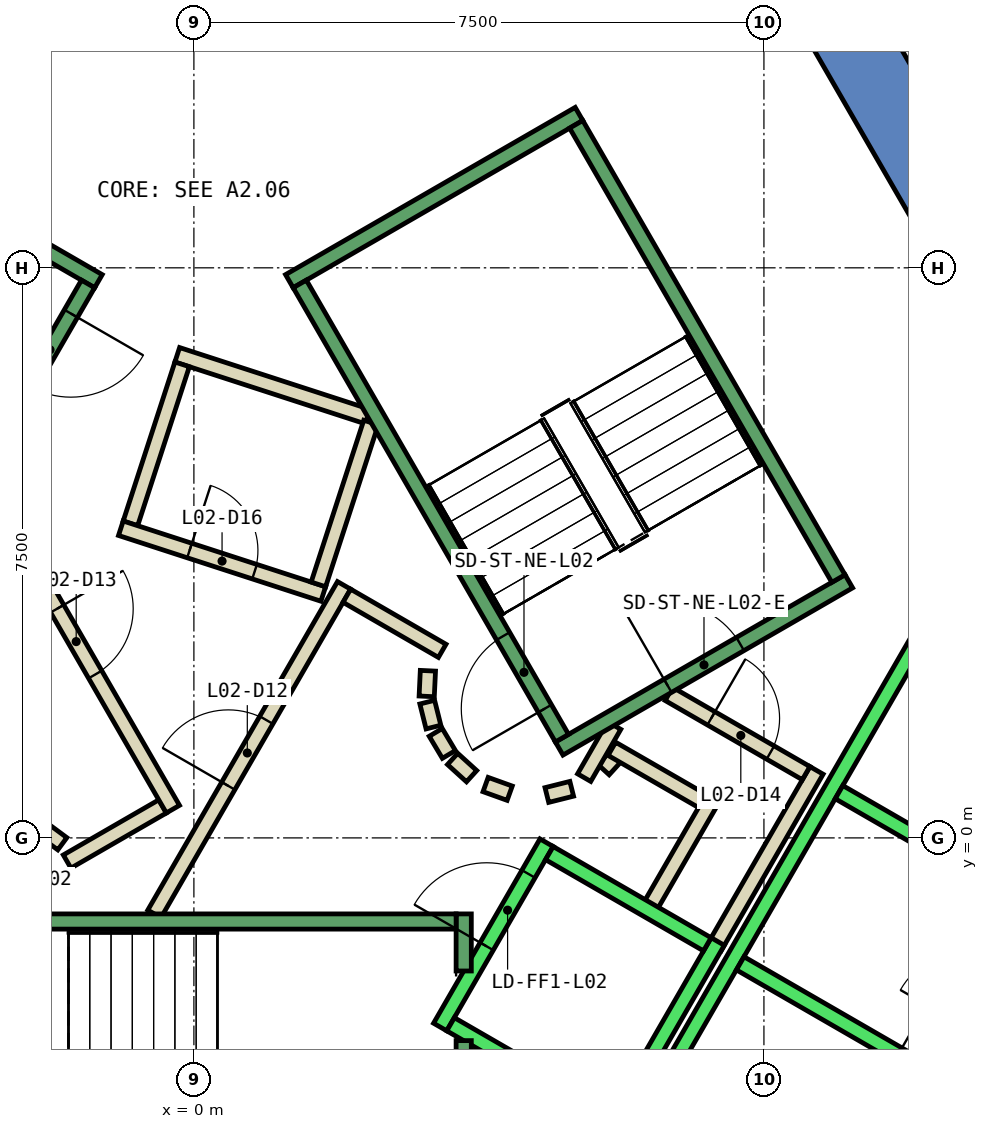
"""IFC4 building model, lengths in metres.
Left out: names, types, materials, properties, quantities, classifications, styles, units other than length and angle.
Written with IfcOpenShell. Run it as: python <this file> out.ifc"""

import sys

from ifc_helpers import new_model, si_unit, direction, frame, frame_2d, origin, place, context, subcontext, project, spatial, polyline, rectangle, outline, extrude, element, fill, save


model = new_model("IFC4")
c1 = context("Model", 3, precision=1e-05, world=origin(), true_north=direction((0.0, 1.0)))
c2 = subcontext(c1, "Body", "Model", "MODEL_VIEW")
j1 = project(units=[si_unit("LENGTHUNIT", "METRE"), si_unit("PLANEANGLEUNIT", "RADIAN")], contexts=[c1])
p1 = place(None, origin())
s1 = spatial("IfcSite", under=j1, at=p1, CompositionType="ELEMENT")
p2 = place(p1, origin())
s2 = spatial("IfcBuilding", under=s1, at=p2, CompositionType="ELEMENT")
p3 = place(p2, frame((0.0, 0.0, 15.0)))
s3 = spatial("IfcBuildingStorey", under=s2, at=p3, CompositionType="ELEMENT", Elevation=15.0)
p4 = place(p3, frame((0.0, 0.0, -0.45)))
e1 = element("IfcWall", 1, at=p4, inside=s3, PredefinedType="SHEAR", context=c2, shape_type="SweptSolid", body=[
    extrude(outline(polyline([(8.517, 11.748), (7.651, 11.248), (12.702, 2.5), (13.856, 2.5), (8.517, 11.748)])), origin(), (0.0, 0.0, 1.0), 5.0),
])
p5 = place(p3, frame((0.0, 0.0, -0.45)))
e2 = element("IfcWall", 2, at=p5, inside=s3, PredefinedType="SHEAR", context=c2, shape_type="SweptSolid", body=[
    extrude(outline(polyline([(10.717, -2.937), (9.851, -2.437), (9.201, -3.563), (10.067, -4.063), (10.717, -2.937)])), origin(), (0.0, 0.0, 1.0), 5.0),
])
p6 = place(p3, frame((5.39, 0.898, 0.0), z_axis=(0.0, 0.0, 1.0), x_axis=(0.673828488714, 0.738887791073, 0.0)))
e3 = element("IfcWall", 3, at=p6, inside=s3, PredefinedType="PARTITIONING", context=c2, shape_type="SweptSolid", body=[
    extrude(rectangle(XDim=0.263, YDim=0.2, at=frame_2d((0.131, 0.0))), origin(), (0.0, 0.0, 1.0), 4.55),
])
p7 = place(p3, frame((5.499, 1.172, 0.0), z_axis=(0.0, 0.0, 1.0), x_axis=(0.866333505267, -0.499465972466, 0.0)))
e4 = element("IfcWall", 4, at=p7, inside=s3, PredefinedType="PARTITIONING", context=c2, shape_type="SweptSolid", body=[
    extrude(rectangle(XDim=1.374, YDim=0.2, at=frame_2d((0.687, 0.0))), origin(), (0.0, 0.0, 1.0), 4.55),
])
p8 = place(p3, frame((6.826, 0.522, 0.0), z_axis=(0.0, 0.0, 1.0), x_axis=(-0.500016722714, -0.866015748706, 0.0)))
e5 = element("IfcWall", 5, at=p8, inside=s3, PredefinedType="PARTITIONING", context=c2, shape_type="SweptSolid", body=[
    extrude(rectangle(XDim=1.7, YDim=0.2, at=frame_2d((0.85, 0.0))), origin(), (0.0, 0.0, 1.0), 4.55),
])
p9 = place(p3, frame((8.192, 0.888, 0.0), z_axis=(0.0, 0.0, 1.0), x_axis=(-0.499940625693, -0.866059680843, 0.0)))
e6 = element("IfcWall", 6, at=p9, inside=s3, PredefinedType="PARTITIONING", context=c2, shape_type="SweptSolid", body=[
    extrude(rectangle(XDim=2.68, YDim=0.2, at=frame_2d((1.34, 0.0))), origin(), (0.0, 0.0, 1.0), 4.55),
])
p10 = place(p3, frame((5.135, 0.793, 0.0), z_axis=(0.0, 0.0, 1.0), x_axis=(0.499526442893, 0.866298639529, 0.0)))
e7 = element("IfcWall", 7, at=p10, inside=s3, PredefinedType="PARTITIONING", context=c2, shape_type="SweptSolid", body=[
    extrude(rectangle(XDim=0.791, YDim=0.2, at=frame_2d((0.396, 0.0))), origin(), (0.0, 0.0, 1.0), 4.55),
])
p11 = place(p3, frame((6.25, 1.894, 0.0), z_axis=(0.0, 0.0, 1.0), x_axis=(0.866043184279, -0.499969202016, 0.0)))
e8 = element("IfcWall", 8, at=p11, inside=s3, PredefinedType="PARTITIONING", context=c2, shape_type="SweptSolid", body=[
    extrude(rectangle(XDim=2.084, YDim=0.2, at=frame_2d((1.042, 0.0))), origin(), (0.0, 0.0, 1.0), 4.55),
])
p12 = place(p11, frame((0.642, 0.0, 0.0)))
e9 = element("IfcOpeningElement", 9, at=p12, cuts=e8, PredefinedType="OPENING", context=c2, shape_type="SweptSolid", body=[
    extrude(rectangle(XDim=0.9, YDim=2.1, at=frame_2d((0.45, 1.05))), frame((0.0, 0.11, 0.0), z_axis=(0.0, -1.0, 0.0), x_axis=(1.0, 0.0, 0.0)), (0.0, 0.0, 1.0), 0.22),
])
p13 = place(p3, frame((2.285, 5.543, 0.0), z_axis=(0.0, 0.0, 1.0), x_axis=(-0.951121264368, 0.308817649215, 0.0)))
e10 = element("IfcWall", 10, at=p13, inside=s3, PredefinedType="PARTITIONING", context=c2, shape_type="SweptSolid", body=[
    extrude(rectangle(XDim=2.633, YDim=0.2, at=frame_2d((1.316, 0.0))), origin(), (0.0, 0.0, 1.0), 4.55),
])
p14 = place(p3, frame((-0.155, 6.23, 0.0), z_axis=(0.0, 0.0, 1.0), x_axis=(-0.309093600997, -0.951031621884, 0.0)))
e11 = element("IfcWall", 11, at=p14, inside=s3, PredefinedType="PARTITIONING", context=c2, shape_type="SweptSolid", body=[
    extrude(rectangle(XDim=2.2, YDim=0.2, at=frame_2d((1.1, 0.0))), origin(), (0.0, 0.0, 1.0), 4.55),
])
p15 = place(p3, frame((-0.961, 4.074, 0.0), z_axis=(0.0, 0.0, 1.0), x_axis=(0.951079555704, -0.308946077369, 0.0)))
e12 = element("IfcWall", 12, at=p15, inside=s3, PredefinedType="PARTITIONING", context=c2, shape_type="SweptSolid", body=[
    extrude(rectangle(XDim=2.8, YDim=0.2, at=frame_2d((1.4, 0.0))), origin(), (0.0, 0.0, 1.0), 4.55),
])
p16 = place(p15, frame((0.95, 0.0, 0.0)))
e13 = element("IfcOpeningElement", 13, at=p16, cuts=e12, PredefinedType="OPENING", context=c2, shape_type="SweptSolid", body=[
    extrude(rectangle(XDim=0.9, YDim=2.1, at=frame_2d((0.45, 1.05))), frame((0.0, 0.11, 0.0), z_axis=(0.0, -1.0, 0.0), x_axis=(1.0, 0.0, 0.0)), (0.0, 0.0, 1.0), 0.22),
])
p17 = place(p3, frame((1.638, 3.335, 0.0), z_axis=(0.0, 0.0, 1.0), x_axis=(0.309152647294, 0.951012429294, 0.0)))
e14 = element("IfcWall", 14, at=p17, inside=s3, PredefinedType="PARTITIONING", context=c2, shape_type="SweptSolid", body=[
    extrude(rectangle(XDim=2.239, YDim=0.2, at=frame_2d((1.119, 0.0))), origin(), (0.0, 0.0, 1.0), 4.55),
])
p18 = place(p3, frame((3.079, 2.199, 0.0), z_axis=(0.0, 0.0, 1.0), x_axis=(-0.047771483479, -0.998858290933, 0.0)))
e15 = element("IfcWall", 15, at=p18, inside=s3, PredefinedType="PARTITIONING", context=c2, shape_type="SweptSolid", body=[
    extrude(rectangle(XDim=0.337, YDim=0.2, at=frame_2d((0.169, 0.0))), origin(), (0.0, 0.0, 1.0), 4.55),
])
p19 = place(p3, frame((3.07, 1.786, 0.0), z_axis=(0.0, 0.0, 1.0), x_axis=(0.242705583207, -0.970099994784, 0.0)))
e16 = element("IfcWall", 16, at=p19, inside=s3, PredefinedType="PARTITIONING", context=c2, shape_type="SweptSolid", body=[
    extrude(rectangle(XDim=0.338, YDim=0.2, at=frame_2d((0.169, 0.0))), origin(), (0.0, 0.0, 1.0), 4.55),
])
for number, where, z_axis, x_axis in (
    (17, (3.182, 1.388, 0.0), (0.0, 0.0, 1.0), (0.512, -0.859, 0.0)),
    (18, (3.404, 1.039, 0.0), (0.0, 0.0, 1.0), (0.74, -0.672, 0.0)),
):
    element("IfcWall", number, at=place(p3, frame(where, z_axis=z_axis, x_axis=x_axis)), inside=s3, PredefinedType="PARTITIONING", context=c2, shape_type="SweptSolid", body=[
        extrude(rectangle(XDim=0.338, YDim=0.2, at=frame_2d((0.169, 0.0))), origin(), (0.0, 0.0, 1.0), 4.55),
    ])
p20 = place(p3, frame((3.838, 0.702, 0.0), z_axis=(0.0, 0.0, 1.0), x_axis=(0.941035081519, -0.338308993895, 0.0)))
e19 = element("IfcWall", 19, at=p20, inside=s3, PredefinedType="PARTITIONING", context=c2, shape_type="SweptSolid", body=[
    extrude(rectangle(XDim=0.337, YDim=0.2, at=frame_2d((0.168, 0.0))), origin(), (0.0, 0.0, 1.0), 4.55),
])
p21 = place(p3, frame((4.644, 0.564, 0.0), z_axis=(0.0, 0.0, 1.0), x_axis=(0.969929076366, 0.243387729394, 0.0)))
e20 = element("IfcWall", 20, at=p21, inside=s3, PredefinedType="PARTITIONING", context=c2, shape_type="SweptSolid", body=[
    extrude(rectangle(XDim=0.337, YDim=0.2, at=frame_2d((0.168, 0.0))), origin(), (0.0, 0.0, 1.0), 4.55),
])
p22 = place(p3, frame((-0.52, -1.0, 0.0), z_axis=(0.0, 0.0, 1.0), x_axis=(0.50011622646, 0.865958290007, 0.0)))
e21 = element("IfcWall", 21, at=p22, inside=s3, PredefinedType="PARTITIONING", context=c2, shape_type="SweptSolid", body=[
    extrude(rectangle(XDim=4.991, YDim=0.2, at=frame_2d((2.496, 0.0))), origin(), (0.0, 0.0, 1.0), 4.55),
])
p23 = place(p22, frame((1.945, 0.0, 0.0)))
e22 = element("IfcOpeningElement", 22, at=p23, cuts=e21, PredefinedType="OPENING", context=c2, shape_type="SweptSolid", body=[
    extrude(rectangle(XDim=1.0, YDim=2.1, at=frame_2d((0.5, 1.05))), frame((0.0, 0.11, 0.0), z_axis=(0.0, -1.0, 0.0), x_axis=(1.0, 0.0, 0.0)), (0.0, 0.0, 1.0), 0.22),
])
p24 = place(p3, frame((2.012, 3.186, 0.0), z_axis=(0.0, 0.0, 1.0), x_axis=(0.865891012941, -0.500232699559, 0.0)))
e23 = element("IfcWall", 23, at=p24, inside=s3, PredefinedType="PARTITIONING", context=c2, shape_type="SweptSolid", body=[
    extrude(rectangle(XDim=1.449, YDim=0.2, at=frame_2d((0.725, 0.0))), origin(), (0.0, 0.0, 1.0), 4.55),
])
p25 = place(p3, frame((-0.412, 0.414, 0.0), z_axis=(0.0, 0.0, 1.0), x_axis=(-0.866017369001, -0.500013916395, 0.0)))
e24 = element("IfcWall", 24, at=p25, inside=s3, PredefinedType="PARTITIONING", context=c2, shape_type="SweptSolid", body=[
    extrude(rectangle(XDim=1.45, YDim=0.2, at=frame_2d((0.725, 0.0))), origin(), (0.0, 0.0, 1.0), 4.55),
])
p26 = place(p3, frame((-1.731, -0.077, 0.0), z_axis=(0.0, 0.0, 1.0), x_axis=(-0.804311165252, 0.594208338422, 0.0)))
e25 = element("IfcWall", 25, at=p26, inside=s3, PredefinedType="PARTITIONING", context=c2, shape_type="SweptSolid", body=[
    extrude(rectangle(XDim=0.338, YDim=0.2, at=frame_2d((0.169, 0.0))), origin(), (0.0, 0.0, 1.0), 4.55),
])
p27 = place(p3, frame((-2.771, 4.7, 0.0), z_axis=(0.0, 0.0, 1.0), x_axis=(0.499969479948, -0.866043023828, 0.0)))
e26 = element("IfcWall", 26, at=p27, inside=s3, PredefinedType="PARTITIONING", context=c2, shape_type="SweptSolid", body=[
    extrude(rectangle(XDim=4.99, YDim=0.2, at=frame_2d((2.495, 0.0))), origin(), (0.0, 0.0, 1.0), 4.55),
])
p28 = place(p27, frame((1.945, 0.0, 0.0)))
e27 = element("IfcOpeningElement", 27, at=p28, cuts=e26, PredefinedType="OPENING", context=c2, shape_type="SweptSolid", body=[
    extrude(rectangle(XDim=1.0, YDim=2.1, at=frame_2d((0.5, 1.05))), frame((0.0, 0.11, 0.0), z_axis=(0.0, -1.0, 0.0), x_axis=(1.0, 0.0, 0.0)), (0.0, 0.0, 1.0), 0.22),
])
p29 = place(p3, frame((3.24, -2.488, 0.0), z_axis=(0.0, 0.0, 1.0), x_axis=(0.49994636267, 0.866056369097, 0.0)))
e28 = element("IfcWall", 28, at=p29, inside=s3, PredefinedType="STANDARD", context=c2, shape_type="SweptSolid", body=[
    extrude(rectangle(XDim=2.8, YDim=0.2, at=frame_2d((1.4, 0.0))), origin(), (0.0, 0.0, 1.0), 4.55),
])
p30 = place(p29, frame((1.225, 0.0, 0.0)))
e29 = element("IfcOpeningElement", 29, at=p30, cuts=e28, PredefinedType="OPENING", context=c2, shape_type="SweptSolid", body=[
    extrude(rectangle(XDim=1.1, YDim=2.1, at=frame_2d((0.55, 1.05))), frame((0.0, 0.11, 0.0), z_axis=(0.0, -1.0, 0.0), x_axis=(1.0, 0.0, 0.0)), (0.0, 0.0, 1.0), 0.22),
])
p31 = place(p3, frame((5.492, -3.788, 0.0), z_axis=(0.0, 0.0, 1.0), x_axis=(0.500011755427, 0.866018616679, 0.0)))
e30 = element("IfcWall", 30, at=p31, inside=s3, PredefinedType="STANDARD", context=c2, shape_type="SweptSolid", body=[
    extrude(rectangle(XDim=2.8, YDim=0.2, at=frame_2d((1.4, 0.0))), origin(), (0.0, 0.0, 1.0), 4.55),
])
p32 = place(p3, frame((3.377, -2.452, 0.0), z_axis=(0.0, 0.0, 1.0), x_axis=(0.865955154139, -0.50012165622, 0.0)))
e31 = element("IfcWall", 31, at=p32, inside=s3, PredefinedType="STANDARD", context=c2, shape_type="SweptSolid", body=[
    extrude(rectangle(XDim=2.4, YDim=0.2, at=frame_2d((1.2, 0.0))), origin(), (0.0, 0.0, 1.0), 4.55),
])
p33 = place(p3, frame((4.677, -0.2, 0.0), z_axis=(0.0, 0.0, 1.0), x_axis=(0.865973769406, -0.500089422704, 0.0)))
e32 = element("IfcWall", 32, at=p33, inside=s3, PredefinedType="STANDARD", context=c2, shape_type="SweptSolid", body=[
    extrude(rectangle(XDim=2.399, YDim=0.2, at=frame_2d((1.2, 0.0))), origin(), (0.0, 0.0, 1.0), 4.55),
])
p34 = place(p3, frame((4.451, -6.19, 0.0), z_axis=(0.0, 0.0, 1.0), x_axis=(0.50000090737, 0.866024879913, 0.0)))
e33 = element("IfcWall", 33, at=p34, inside=s3, PredefinedType="STANDARD", context=c2, shape_type="SweptSolid", body=[
    extrude(rectangle(XDim=10.6, YDim=0.2, at=frame_2d((5.3, 0.0))), origin(), (0.0, 0.0, 1.0), 4.55),
])
for number, where, z_axis, x_axis in (
    (34, (7.188, -1.65, 0.0), (0.0, 0.0, 1.0), (0.866, -0.5, 0.0)),
    (35, (8.488, 0.602, 0.0), (0.0, 0.0, 1.0), (0.866, -0.5, 0.0)),
):
    element("IfcWall", number, at=place(p3, frame(where, z_axis=z_axis, x_axis=x_axis)), inside=s3, PredefinedType="STANDARD", context=c2, shape_type="SweptSolid", body=[
        extrude(rectangle(XDim=2.5, YDim=0.2, at=frame_2d((1.25, 0.0))), origin(), (0.0, 0.0, 1.0), 4.55),
    ])
p35 = place(p3, frame((3.55, -2.667, 0.0), z_axis=(0.0, 0.0, 1.0), x_axis=(0.0, -1.0, 0.0)))
e36 = element("IfcWall", 36, at=p35, inside=s3, PredefinedType="STANDARD", context=c2, shape_type="SweptSolid", body=[
    extrude(rectangle(XDim=2.733, YDim=0.2, at=frame_2d((1.366, 0.0))), origin(), (0.0, 0.0, 1.0), 4.55),
])
p36 = place(p3, frame((3.55, -1.0, 0.0), z_axis=(0.0, 0.0, 1.0), x_axis=(0.0, -1.0, 0.0)))
e37 = element("IfcWall", 37, at=p36, inside=s3, PredefinedType="STANDARD", context=c2, shape_type="SweptSolid", body=[
    extrude(rectangle(XDim=0.751, YDim=0.2, at=frame_2d((0.375, 0.0))), origin(), (0.0, 0.0, 1.0), 4.55),
])
p37 = place(p3, frame((-3.45, -1.1, 0.0), z_axis=(0.0, 0.0, 1.0), x_axis=(1.0, 0.0, 0.0)))
e38 = element("IfcWall", 38, at=p37, inside=s3, PredefinedType="STANDARD", context=c2, shape_type="SweptSolid", body=[
    extrude(rectangle(XDim=6.9, YDim=0.2, at=frame_2d((3.45, 0.0))), origin(), (0.0, 0.0, 1.0), 4.55),
])
p38 = place(p37, frame((0.45, 0.0, 0.0)))
e39 = element("IfcOpeningElement", 39, at=p38, cuts=e38, PredefinedType="OPENING", context=c2, shape_type="SweptSolid", body=[
    extrude(rectangle(XDim=1.1, YDim=2.2, at=frame_2d((0.55, 1.1))), frame((0.0, 0.11, 0.0), z_axis=(0.0, -1.0, 0.0), x_axis=(1.0, 0.0, 0.0)), (0.0, 0.0, 1.0), 0.22),
])
p39 = place(p3, frame((4.806, 1.176, 0.0), z_axis=(0.0, 0.0, 1.0), x_axis=(0.866059941101, 0.499940174841, 0.0)))
e40 = element("IfcWall", 40, at=p39, inside=s3, PredefinedType="STANDARD", context=c2, shape_type="SweptSolid", body=[
    extrude(rectangle(XDim=4.4, YDim=0.2, at=frame_2d((2.2, 0.0))), origin(), (0.0, 0.0, 1.0), 4.55),
])
p40 = place(p39, frame((1.65, 0.0, 0.0)))
e41 = element("IfcOpeningElement", 41, at=p40, cuts=e40, PredefinedType="OPENING", context=c2, shape_type="SweptSolid", body=[
    extrude(rectangle(XDim=1.1, YDim=2.2, at=frame_2d((0.55, 1.1))), frame((0.0, 0.11, 0.0), z_axis=(0.0, -1.0, 0.0), x_axis=(1.0, 0.0, 0.0)), (0.0, 0.0, 1.0), 0.22),
])
p41 = place(p3, frame((1.256, 7.324, 0.0), z_axis=(0.0, 0.0, 1.0), x_axis=(0.866046073146, 0.499964197906, 0.0)))
e42 = element("IfcWall", 42, at=p41, inside=s3, PredefinedType="STANDARD", context=c2, shape_type="SweptSolid", body=[
    extrude(rectangle(XDim=4.4, YDim=0.2, at=frame_2d((2.2, 0.0))), origin(), (0.0, 0.0, 1.0), 4.55),
])
p42 = place(p3, frame((4.843, 1.312, 0.0), z_axis=(0.0, 0.0, 1.0), x_axis=(-0.499963383562, 0.866046543262, 0.0)))
e43 = element("IfcWall", 43, at=p42, inside=s3, PredefinedType="STANDARD", context=c2, shape_type="SweptSolid", body=[
    extrude(rectangle(XDim=6.9, YDim=0.2, at=frame_2d((3.45, 0.0))), origin(), (0.0, 0.0, 1.0), 4.55),
])
p43 = place(p42, frame((0.45, 0.0, 0.0)))
e44 = element("IfcOpeningElement", 44, at=p43, cuts=e43, PredefinedType="OPENING", context=c2, shape_type="SweptSolid", body=[
    extrude(rectangle(XDim=1.1, YDim=2.2, at=frame_2d((0.55, 1.1))), frame((0.0, 0.11, 0.0), z_axis=(0.0, -1.0, 0.0), x_axis=(1.0, 0.0, 0.0)), (0.0, 0.0, 1.0), 0.22),
])
p44 = place(p3, frame((8.48, 3.412, 0.0), z_axis=(0.0, 0.0, 1.0), x_axis=(-0.499978703459, 0.866037698999, 0.0)))
e45 = element("IfcWall", 45, at=p44, inside=s3, PredefinedType="STANDARD", context=c2, shape_type="SweptSolid", body=[
    extrude(rectangle(XDim=6.9, YDim=0.2, at=frame_2d((3.45, 0.0))), origin(), (0.0, 0.0, 1.0), 4.55),
])
p45 = place(p3, frame((-1.256, 7.324, 0.0), z_axis=(0.0, 0.0, 1.0), x_axis=(-0.866046073146, 0.499964197906, 0.0)))
e46 = element("IfcWall", 46, at=p45, inside=s3, PredefinedType="STANDARD", context=c2, shape_type="SweptSolid", body=[
    extrude(rectangle(XDim=4.4, YDim=0.2, at=frame_2d((2.2, 0.0))), origin(), (0.0, 0.0, 1.0), 4.55),
])
p46 = place(p45, frame((1.65, 0.0, 0.0)))
e47 = element("IfcOpeningElement", 47, at=p46, cuts=e46, PredefinedType="OPENING", context=c2, shape_type="SweptSolid", body=[
    extrude(rectangle(XDim=1.1, YDim=2.2, at=frame_2d((0.55, 1.1))), frame((0.0, 0.11, 0.0), z_axis=(0.0, -1.0, 0.0), x_axis=(1.0, 0.0, 0.0)), (0.0, 0.0, 1.0), 0.22),
])
p47 = place(p3, frame((-1.393, 7.288, 0.0), z_axis=(0.0, 0.0, 1.0), x_axis=(-0.499963383562, -0.866046543262, 0.0)))
e48 = element("IfcWall", 48, at=p47, inside=s3, PredefinedType="STANDARD", context=c2, shape_type="SweptSolid", body=[
    extrude(rectangle(XDim=6.9, YDim=0.2, at=frame_2d((3.45, 0.0))), origin(), (0.0, 0.0, 1.0), 4.55),
])
p48 = place(p47, frame((0.45, 0.0, 0.0)))
e49 = element("IfcOpeningElement", 49, at=p48, cuts=e48, PredefinedType="OPENING", context=c2, shape_type="SweptSolid", body=[
    extrude(rectangle(XDim=1.1, YDim=2.2, at=frame_2d((0.55, 1.1))), frame((0.0, 0.11, 0.0), z_axis=(0.0, -1.0, 0.0), x_axis=(1.0, 0.0, 0.0)), (0.0, 0.0, 1.0), 0.22),
])
p49 = place(p23, origin())
e50 = element("IfcDoor", 50, at=p49, inside=s3, OperationType="SINGLE_SWING_LEFT", PredefinedType="DOOR", context=c2, shape_type="SweptSolid", body=[
    extrude(rectangle(XDim=1.0, YDim=2.1, at=frame_2d((0.5, 1.05))), frame((0.0, 0.025, 0.0), z_axis=(0.0, -1.0, 0.0), x_axis=(1.0, 0.0, 0.0)), (0.0, 0.0, 1.0), 0.05),
])
fill(e22, e50)
p50 = place(p28, origin())
e51 = element("IfcDoor", 51, at=p50, inside=s3, OperationType="SINGLE_SWING_RIGHT", PredefinedType="DOOR", context=c2, shape_type="SweptSolid", body=[
    extrude(rectangle(XDim=1.0, YDim=2.1, at=frame_2d((0.5, 1.05))), frame((0.0, 0.025, 0.0), z_axis=(0.0, -1.0, 0.0), x_axis=(1.0, 0.0, 0.0)), (0.0, 0.0, 1.0), 0.05),
])
fill(e27, e51)
p51 = place(p12, origin())
e52 = element("IfcDoor", 52, at=p51, inside=s3, OperationType="SINGLE_SWING_LEFT", PredefinedType="DOOR", context=c2, shape_type="SweptSolid", body=[
    extrude(rectangle(XDim=0.9, YDim=2.1, at=frame_2d((0.45, 1.05))), frame((0.0, 0.025, 0.0), z_axis=(0.0, -1.0, 0.0), x_axis=(1.0, 0.0, 0.0)), (0.0, 0.0, 1.0), 0.05),
])
fill(e9, e52)
p52 = place(p16, origin())
e53 = element("IfcDoor", 53, at=p52, inside=s3, OperationType="SINGLE_SWING_LEFT", PredefinedType="DOOR", context=c2, shape_type="SweptSolid", body=[
    extrude(rectangle(XDim=0.9, YDim=2.1, at=frame_2d((0.45, 1.05))), frame((0.0, 0.025, 0.0), z_axis=(0.0, -1.0, 0.0), x_axis=(1.0, 0.0, 0.0)), (0.0, 0.0, 1.0), 0.05),
])
fill(e13, e53)
p53 = place(p30, origin())
e54 = element("IfcDoor", 54, at=p53, inside=s3, OperationType="SLIDING_TO_LEFT", PredefinedType="DOOR", context=c2, shape_type="SweptSolid", body=[
    extrude(rectangle(XDim=1.1, YDim=2.1, at=frame_2d((0.55, 1.05))), frame((0.0, 0.025, 0.0), z_axis=(0.0, -1.0, 0.0), x_axis=(1.0, 0.0, 0.0)), (0.0, 0.0, 1.0), 0.05),
])
fill(e29, e54)
p54 = place(p43, origin())
e55 = element("IfcDoor", 55, at=p54, inside=s3, OperationType="SINGLE_SWING_LEFT", PredefinedType="DOOR", context=c2, shape_type="SweptSolid", body=[
    extrude(rectangle(XDim=1.1, YDim=2.2, at=frame_2d((0.55, 1.1))), frame((0.0, 0.025, 0.0), z_axis=(0.0, -1.0, 0.0), x_axis=(1.0, 0.0, 0.0)), (0.0, 0.0, 1.0), 0.05),
])
fill(e44, e55)
p55 = place(p40, origin())
e56 = element("IfcDoor", 56, at=p55, inside=s3, OperationType="SINGLE_SWING_LEFT", PredefinedType="DOOR", context=c2, shape_type="SweptSolid", body=[
    extrude(rectangle(XDim=1.1, YDim=2.2, at=frame_2d((0.55, 1.1))), frame((0.0, 0.025, 0.0), z_axis=(0.0, -1.0, 0.0), x_axis=(1.0, 0.0, 0.0)), (0.0, 0.0, 1.0), 0.05),
])
fill(e41, e56)
p56 = place(p48, origin())
e57 = element("IfcDoor", 57, at=p56, inside=s3, OperationType="SINGLE_SWING_LEFT", PredefinedType="DOOR", context=c2, shape_type="SweptSolid", body=[
    extrude(rectangle(XDim=1.1, YDim=2.2, at=frame_2d((0.55, 1.1))), frame((0.0, 0.025, 0.0), z_axis=(0.0, -1.0, 0.0), x_axis=(1.0, 0.0, 0.0)), (0.0, 0.0, 1.0), 0.05),
])
fill(e49, e57)
save(model, sys.argv[1])
